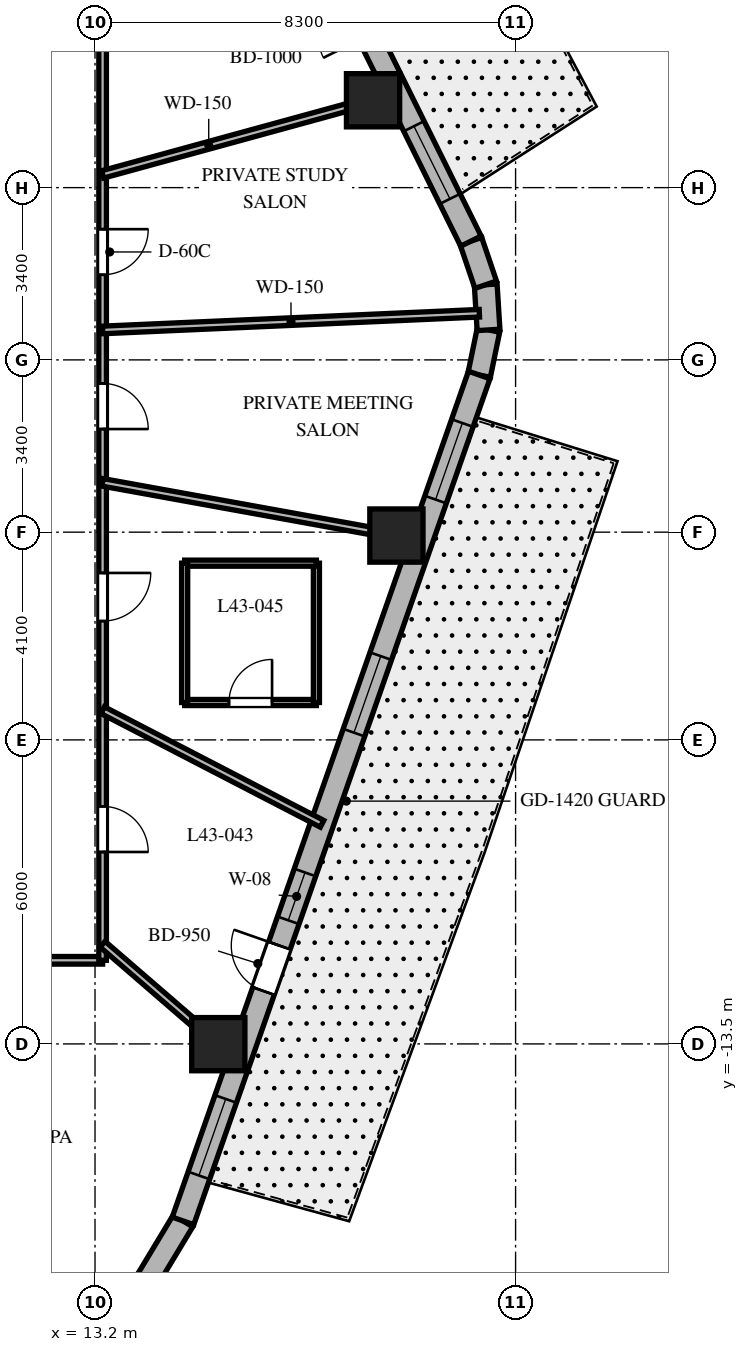
"""IFC4 building model, lengths in metres.
Left out: names, types, materials, properties, quantities, classifications, styles, units other than length and angle.
Written with IfcOpenShell. Run it as: python <this file> out.ifc"""

import sys

from ifc_helpers import new_model, si_unit, direction, frame, frame_2d, origin, origin_2d, place, context, subcontext, project, spatial, rectangle, extrude, element, fill, save


model = new_model("IFC4")
c1 = context("Model", 3, precision=1e-05, world=origin(), true_north=direction((0.0, 1.0)))
c2 = subcontext(c1, "Body", "Model", "MODEL_VIEW")
j1 = project(units=[si_unit("LENGTHUNIT", "METRE"), si_unit("PLANEANGLEUNIT", "RADIAN")], contexts=[c1])
p1 = place(None, origin())
s1 = spatial("IfcSite", under=j1, at=p1, CompositionType="ELEMENT")
p2 = place(p1, origin())
s2 = spatial("IfcBuilding", under=s1, at=p2, CompositionType="ELEMENT")
p3 = place(p2, frame((0.0, 0.0, 175.6)))
s3 = spatial("IfcBuildingStorey", under=s2, at=p3, CompositionType="ELEMENT", Elevation=175.6)
for number, where, z_axis, x_axis in (
    (1, (15.633, -13.505, 0.0), (0.0, 0.0, 1.0), (1.0, 0.0, 0.0)),
    (2, (19.148, -3.467, 0.0), (0.0, 0.0, 1.0), (1.0, 0.0, 0.0)),
    (3, (18.687, 5.124, 0.0), (0.0, 0.0, 1.0), (1.0, 0.0, 0.0)),
):
    element("IfcColumn", number, at=place(p3, frame(where, z_axis=z_axis, x_axis=x_axis)), inside=s3, PredefinedType="COLUMN", context=c2, shape_type="SweptSolid", body=[
        extrude(rectangle(XDim=1.05, YDim=1.05, at=origin_2d()), origin(), (0.0, 0.0, 1.0), 3.7),
    ])
p4 = place(p3, frame((14.214, -18.192, 0.0), z_axis=(0.0, 0.0, 1.0), x_axis=(0.516340945502, 0.856383108193, 0.0)))
e4 = element("IfcWall", 4, at=p4, inside=s3, PredefinedType="SOLIDWALL", context=c2, shape_type="SweptSolid", body=[
    extrude(rectangle(XDim=1.4, YDim=0.45, at=frame_2d((0.7, 0.0))), origin(), (0.0, 0.0, 1.0), 3.4),
])
p5 = place(p3, frame((20.782, -0.298, 0.0), z_axis=(0.0, 0.0, 1.0), x_axis=(0.202570068411, 0.979267771033, 0.0)))
e5 = element("IfcWall", 5, at=p5, inside=s3, PredefinedType="SOLIDWALL", context=c2, shape_type="SweptSolid", body=[
    extrude(rectangle(XDim=0.909, YDim=0.45, at=frame_2d((0.454, 0.0))), origin(), (0.0, 0.0, 1.0), 3.4),
])
p6 = place(p3, frame((20.966, 0.592, 0.0), z_axis=(0.0, 0.0, 1.0), x_axis=(-0.061748898935, 0.998091715966, 0.0)))
e6 = element("IfcWall", 6, at=p6, inside=s3, PredefinedType="SOLIDWALL", context=c2, shape_type="SweptSolid", body=[
    extrude(rectangle(XDim=0.894, YDim=0.45, at=frame_2d((0.447, 0.0))), origin(), (0.0, 0.0, 1.0), 3.4),
])
p7 = place(p3, frame((20.911, 1.484, 0.0), z_axis=(0.0, 0.0, 1.0), x_axis=(-0.321623334353, 0.946867694453, 0.0)))
e7 = element("IfcWall", 7, at=p7, inside=s3, PredefinedType="SOLIDWALL", context=c2, shape_type="SweptSolid", body=[
    extrude(rectangle(XDim=0.909, YDim=0.45, at=frame_2d((0.454, 0.0))), origin(), (0.0, 0.0, 1.0), 3.4),
])
p8 = place(p3, frame((14.937, -16.993, 0.0), z_axis=(0.0, 0.0, 1.0), x_axis=(0.330431575061, 0.943829949834, 0.0)))
e8 = element("IfcWall", 8, at=p8, inside=s3, PredefinedType="SOLIDWALL", context=c2, shape_type="SweptSolid", body=[
    extrude(rectangle(XDim=17.689, YDim=0.45, at=frame_2d((8.844, 0.0))), origin(), (0.0, 0.0, 1.0), 3.4),
])
p9 = place(p8, frame((4.807, 0.0, 0.0)))
e9 = element("IfcOpeningElement", 9, at=p9, cuts=e8, PredefinedType="OPENING", context=c2, shape_type="SweptSolid", body=[
    extrude(rectangle(XDim=0.95, YDim=2.15, at=frame_2d((0.475, 1.075))), frame((0.0, 0.235, 0.0), z_axis=(0.0, -1.0, 0.0), x_axis=(1.0, 0.0, 0.0)), (0.0, 0.0, 1.0), 0.47),
])
p10 = place(p8, frame((0.95, 0.0, 0.8)))
e10 = element("IfcOpeningElement", 10, at=p10, cuts=e8, PredefinedType="OPENING", context=c2, shape_type="SweptSolid", body=[
    extrude(rectangle(XDim=1.6, YDim=1.75, at=frame_2d((0.8, 0.875))), frame((0.0, 0.235, 0.0), z_axis=(0.0, -1.0, 0.0), x_axis=(1.0, 0.0, 0.0)), (0.0, 0.0, 1.0), 0.47),
])
p11 = place(p8, frame((6.286, 0.0, 0.8)))
e11 = element("IfcOpeningElement", 11, at=p11, cuts=e8, PredefinedType="OPENING", context=c2, shape_type="SweptSolid", body=[
    extrude(rectangle(XDim=1.0, YDim=1.65, at=frame_2d((0.5, 0.825))), frame((0.0, 0.235, 0.0), z_axis=(0.0, -1.0, 0.0), x_axis=(1.0, 0.0, 0.0)), (0.0, 0.0, 1.0), 0.47),
])
p12 = place(p8, frame((10.21, 0.0, 0.8)))
e12 = element("IfcOpeningElement", 12, at=p12, cuts=e8, PredefinedType="OPENING", context=c2, shape_type="SweptSolid", body=[
    extrude(rectangle(XDim=1.6, YDim=1.75, at=frame_2d((0.8, 0.875))), frame((0.0, 0.235, 0.0), z_axis=(0.0, -1.0, 0.0), x_axis=(1.0, 0.0, 0.0)), (0.0, 0.0, 1.0), 0.47),
])
p13 = place(p8, frame((15.084, 0.0, 0.8)))
e13 = element("IfcOpeningElement", 13, at=p13, cuts=e8, PredefinedType="OPENING", context=c2, shape_type="SweptSolid", body=[
    extrude(rectangle(XDim=1.6, YDim=1.75, at=frame_2d((0.8, 0.875))), frame((0.0, 0.235, 0.0), z_axis=(0.0, -1.0, 0.0), x_axis=(1.0, 0.0, 0.0)), (0.0, 0.0, 1.0), 0.47),
])
p14 = place(p3, frame((20.618, 2.344, 0.0), z_axis=(0.0, 0.0, 1.0), x_axis=(-0.444243691097, 0.895905990002, 0.0)))
e14 = element("IfcWall", 14, at=p14, inside=s3, PredefinedType="SOLIDWALL", context=c2, shape_type="SweptSolid", body=[
    extrude(rectangle(XDim=16.784, YDim=0.45, at=frame_2d((8.392, 0.0))), origin(), (0.0, 0.0, 1.0), 3.4),
])
p15 = place(p14, frame((4.535, 0.0, 0.0)))
e15 = element("IfcOpeningElement", 15, at=p15, cuts=e14, PredefinedType="OPENING", context=c2, shape_type="SweptSolid", body=[
    extrude(rectangle(XDim=1.0, YDim=2.15, at=frame_2d((0.5, 1.075))), frame((0.0, 0.235, 0.0), z_axis=(0.0, -1.0, 0.0), x_axis=(1.0, 0.0, 0.0)), (0.0, 0.0, 1.0), 0.47),
])
p16 = place(p14, frame((0.931, 0.0, 0.8)))
e16 = element("IfcOpeningElement", 16, at=p16, cuts=e14, PredefinedType="OPENING", context=c2, shape_type="SweptSolid", body=[
    extrude(rectangle(XDim=1.6, YDim=1.75, at=frame_2d((0.8, 0.875))), frame((0.0, 0.235, 0.0), z_axis=(0.0, -1.0, 0.0), x_axis=(1.0, 0.0, 0.0)), (0.0, 0.0, 1.0), 0.47),
])
p17 = place(p14, frame((7.642, 0.0, 0.8)))
e17 = element("IfcOpeningElement", 17, at=p17, cuts=e14, PredefinedType="OPENING", context=c2, shape_type="SweptSolid", body=[
    extrude(rectangle(XDim=1.6, YDim=1.75, at=frame_2d((0.8, 0.875))), frame((0.0, 0.235, 0.0), z_axis=(0.0, -1.0, 0.0), x_axis=(1.0, 0.0, 0.0)), (0.0, 0.0, 1.0), 0.47),
])
p18 = place(p14, frame((14.303, 0.0, 0.8)))
e18 = element("IfcOpeningElement", 18, at=p18, cuts=e14, PredefinedType="OPENING", context=c2, shape_type="SweptSolid", body=[
    extrude(rectangle(XDim=1.6, YDim=1.75, at=frame_2d((0.8, 0.875))), frame((0.0, 0.235, 0.0), z_axis=(0.0, -1.0, 0.0), x_axis=(1.0, 0.0, 0.0)), (0.0, 0.0, 1.0), 0.47),
])
p19 = place(p3, frame((13.35, -11.85, 0.0), z_axis=(0.0, 0.0, 1.0), x_axis=(-1.0, 0.0, 0.0)))
e19 = element("IfcWall", 19, at=p19, inside=s3, PredefinedType="PARTITIONING", context=c2, shape_type="SweptSolid", body=[
    extrude(rectangle(XDim=26.7, YDim=0.15, at=frame_2d((13.35, 0.0))), origin(), (0.0, 0.0, 1.0), 2.84),
])
p20 = place(p19, frame((22.7, 0.0, 0.0)))
e20 = element("IfcOpeningElement", 20, at=p20, cuts=e19, PredefinedType="OPENING", context=c2, shape_type="SweptSolid", body=[
    extrude(rectangle(XDim=0.9, YDim=2.03, at=frame_2d((0.45, 1.015))), frame((0.0, 0.085, 0.0), z_axis=(0.0, -1.0, 0.0), x_axis=(1.0, 0.0, 0.0)), (0.0, 0.0, 1.0), 0.17),
])
p21 = place(p19, frame((18.523, 0.0, 0.0)))
e21 = element("IfcOpeningElement", 21, at=p21, cuts=e19, PredefinedType="OPENING", context=c2, shape_type="SweptSolid", body=[
    extrude(rectangle(XDim=0.95, YDim=2.03, at=frame_2d((0.475, 1.015))), frame((0.0, 0.085, 0.0), z_axis=(0.0, -1.0, 0.0), x_axis=(1.0, 0.0, 0.0)), (0.0, 0.0, 1.0), 0.17),
])
p22 = place(p19, frame((14.469, 0.0, 0.0)))
e22 = element("IfcOpeningElement", 22, at=p22, cuts=e19, PredefinedType="OPENING", context=c2, shape_type="SweptSolid", body=[
    extrude(rectangle(XDim=0.95, YDim=2.03, at=frame_2d((0.475, 1.015))), frame((0.0, 0.085, 0.0), z_axis=(0.0, -1.0, 0.0), x_axis=(1.0, 0.0, 0.0)), (0.0, 0.0, 1.0), 0.17),
])
p23 = place(p19, frame((10.314, 0.0, 0.0)))
e23 = element("IfcOpeningElement", 23, at=p23, cuts=e19, PredefinedType="OPENING", context=c2, shape_type="SweptSolid", body=[
    extrude(rectangle(XDim=0.95, YDim=2.03, at=frame_2d((0.475, 1.015))), frame((0.0, 0.085, 0.0), z_axis=(0.0, -1.0, 0.0), x_axis=(1.0, 0.0, 0.0)), (0.0, 0.0, 1.0), 0.17),
])
p24 = place(p19, frame((3.995, 0.0, 0.0)))
e24 = element("IfcOpeningElement", 24, at=p24, cuts=e19, PredefinedType="OPENING", context=c2, shape_type="SweptSolid", body=[
    extrude(rectangle(XDim=0.95, YDim=2.03, at=frame_2d((0.475, 1.015))), frame((0.0, 0.085, 0.0), z_axis=(0.0, -1.0, 0.0), x_axis=(1.0, 0.0, 0.0)), (0.0, 0.0, 1.0), 0.17),
])
p25 = place(p3, frame((13.35, 11.85, 0.0), z_axis=(0.0, 0.0, 1.0), x_axis=(0.0, -1.0, 0.0)))
e25 = element("IfcWall", 25, at=p25, inside=s3, PredefinedType="PARTITIONING", context=c2, shape_type="SweptSolid", body=[
    extrude(rectangle(XDim=23.7, YDim=0.15, at=frame_2d((11.85, 0.0))), origin(), (0.0, 0.0, 1.0), 2.84),
])
p26 = place(p25, frame((9.27, 0.0, 0.0)))
e26 = element("IfcOpeningElement", 26, at=p26, cuts=e25, PredefinedType="OPENING", context=c2, shape_type="SweptSolid", body=[
    extrude(rectangle(XDim=0.9, YDim=2.03, at=frame_2d((0.45, 1.015))), frame((0.0, 0.085, 0.0), z_axis=(0.0, -1.0, 0.0), x_axis=(1.0, 0.0, 0.0)), (0.0, 0.0, 1.0), 0.17),
])
p27 = place(p25, frame((3.765, 0.0, 0.0)))
e27 = element("IfcOpeningElement", 27, at=p27, cuts=e25, PredefinedType="OPENING", context=c2, shape_type="SweptSolid", body=[
    extrude(rectangle(XDim=0.9, YDim=2.03, at=frame_2d((0.45, 1.015))), frame((0.0, 0.085, 0.0), z_axis=(0.0, -1.0, 0.0), x_axis=(1.0, 0.0, 0.0)), (0.0, 0.0, 1.0), 0.17),
])
p28 = place(p25, frame((20.662, 0.0, 0.0)))
e28 = element("IfcOpeningElement", 28, at=p28, cuts=e25, PredefinedType="OPENING", context=c2, shape_type="SweptSolid", body=[
    extrude(rectangle(XDim=0.9, YDim=2.03, at=frame_2d((0.45, 1.015))), frame((0.0, 0.085, 0.0), z_axis=(0.0, -1.0, 0.0), x_axis=(1.0, 0.0, 0.0)), (0.0, 0.0, 1.0), 0.17),
])
p29 = place(p25, frame((16.055, 0.0, 0.0)))
e29 = element("IfcOpeningElement", 29, at=p29, cuts=e25, PredefinedType="OPENING", context=c2, shape_type="SweptSolid", body=[
    extrude(rectangle(XDim=0.95, YDim=2.03, at=frame_2d((0.475, 1.015))), frame((0.0, 0.085, 0.0), z_axis=(0.0, -1.0, 0.0), x_axis=(1.0, 0.0, 0.0)), (0.0, 0.0, 1.0), 0.17),
])
p30 = place(p25, frame((12.315, 0.0, 0.0)))
e30 = element("IfcOpeningElement", 30, at=p30, cuts=e25, PredefinedType="OPENING", context=c2, shape_type="SweptSolid", body=[
    extrude(rectangle(XDim=0.9, YDim=2.03, at=frame_2d((0.45, 1.015))), frame((0.0, 0.085, 0.0), z_axis=(0.0, -1.0, 0.0), x_axis=(1.0, 0.0, 0.0)), (0.0, 0.0, 1.0), 0.17),
])
p31 = place(p3, frame((13.35, 0.591, 0.0), z_axis=(0.0, 0.0, 1.0), x_axis=(0.999020359631, 0.044252921296, 0.0)))
e31 = element("IfcWall", 31, at=p31, inside=s3, PredefinedType="PARTITIONING", context=c2, shape_type="SweptSolid", body=[
    extrude(rectangle(XDim=7.442, YDim=0.15, at=frame_2d((3.721, 0.0))), origin(), (0.0, 0.0, 1.0), 2.64),
])
p32 = place(p3, frame((13.35, 3.661, 0.0), z_axis=(0.0, 0.0, 1.0), x_axis=(0.964397145454, 0.264458211898, 0.0)))
e32 = element("IfcWall", 32, at=p32, inside=s3, PredefinedType="PARTITIONING", context=c2, shape_type="SweptSolid", body=[
    extrude(rectangle(XDim=6.039, YDim=0.15, at=frame_2d((3.019, 0.0))), origin(), (0.0, 0.0, 1.0), 2.64),
])
p33 = place(p3, frame((13.35, -11.533, 0.0), z_axis=(0.0, 0.0, 1.0), x_axis=(0.756711647314, -0.65374879183, 0.0)))
e33 = element("IfcWall", 33, at=p33, inside=s3, PredefinedType="PARTITIONING", context=c2, shape_type="SweptSolid", body=[
    extrude(rectangle(XDim=3.55, YDim=0.15, at=frame_2d((1.775, 0.0))), origin(), (0.0, 0.0, 1.0), 2.64),
])
p34 = place(p3, frame((13.35, -6.913, 0.0), z_axis=(0.0, 0.0, 1.0), x_axis=(0.887989298603, -0.459864116415, 0.0)))
e34 = element("IfcWall", 34, at=p34, inside=s3, PredefinedType="PARTITIONING", context=c2, shape_type="SweptSolid", body=[
    extrude(rectangle(XDim=4.877, YDim=0.15, at=frame_2d((2.438, 0.0))), origin(), (0.0, 0.0, 1.0), 2.64),
])
p35 = place(p3, frame((13.35, -2.417, 0.0), z_axis=(0.0, 0.0, 1.0), x_axis=(0.98399796473, -0.178179699761, 0.0)))
e35 = element("IfcWall", 35, at=p35, inside=s3, PredefinedType="PARTITIONING", context=c2, shape_type="SweptSolid", body=[
    extrude(rectangle(XDim=6.393, YDim=0.15, at=frame_2d((3.197, 0.0))), origin(), (0.0, 0.0, 1.0), 2.64),
])
p36 = place(p3, frame((14.969, -6.762, 0.0), z_axis=(0.0, 0.0, 1.0), x_axis=(1.0, 0.0, 0.0)))
e36 = element("IfcWall", 36, at=p36, inside=s3, PredefinedType="PARTITIONING", context=c2, shape_type="SweptSolid", body=[
    extrude(rectangle(XDim=2.6, YDim=0.12, at=frame_2d((1.3, 0.0))), origin(), (0.0, 0.0, 1.0), 2.972),
])
p37 = place(p36, frame((0.875, 0.0, 0.0)))
e37 = element("IfcOpeningElement", 37, at=p37, cuts=e36, PredefinedType="OPENING", context=c2, shape_type="SweptSolid", body=[
    extrude(rectangle(XDim=0.85, YDim=2.03, at=frame_2d((0.425, 1.015))), frame((0.0, 0.07, 0.0), z_axis=(0.0, -1.0, 0.0), x_axis=(1.0, 0.0, 0.0)), (0.0, 0.0, 1.0), 0.14),
])
p38 = place(p3, frame((17.569, -6.762, 0.0), z_axis=(0.0, 0.0, 1.0), x_axis=(0.0, 1.0, 0.0)))
e38 = element("IfcWall", 38, at=p38, inside=s3, PredefinedType="PARTITIONING", context=c2, shape_type="SweptSolid", body=[
    extrude(rectangle(XDim=2.75, YDim=0.12, at=frame_2d((1.375, 0.0))), origin(), (0.0, 0.0, 1.0), 2.84),
])
p39 = place(p3, frame((17.569, -4.012, 0.0), z_axis=(0.0, 0.0, 1.0), x_axis=(-1.0, 0.0, 0.0)))
e39 = element("IfcWall", 39, at=p39, inside=s3, PredefinedType="PARTITIONING", context=c2, shape_type="SweptSolid", body=[
    extrude(rectangle(XDim=2.6, YDim=0.12, at=frame_2d((1.3, 0.0))), origin(), (0.0, 0.0, 1.0), 2.84),
])
p40 = place(p3, frame((14.969, -4.012, 0.0), z_axis=(0.0, 0.0, 1.0), x_axis=(0.0, -1.0, 0.0)))
e40 = element("IfcWall", 40, at=p40, inside=s3, PredefinedType="PARTITIONING", context=c2, shape_type="SweptSolid", body=[
    extrude(rectangle(XDim=2.75, YDim=0.12, at=frame_2d((1.375, 0.0))), origin(), (0.0, 0.0, 1.0), 2.84),
])
p41 = place(p9, origin())
e41 = element("IfcDoor", 41, at=p41, inside=s3, OperationType="SINGLE_SWING_RIGHT", PredefinedType="DOOR", context=c2, shape_type="SweptSolid", body=[
    extrude(rectangle(XDim=0.95, YDim=2.15, at=frame_2d((0.475, 1.075))), frame((0.0, 0.025, 0.0), z_axis=(0.0, -1.0, 0.0), x_axis=(1.0, 0.0, 0.0)), (0.0, 0.0, 1.0), 0.05),
])
fill(e9, e41)
p42 = place(p10, origin())
e42 = element("IfcWindow", 42, at=p42, inside=s3, PartitioningType="SINGLE_PANEL", PredefinedType="WINDOW", context=c2, shape_type="SweptSolid", body=[
    extrude(rectangle(XDim=1.6, YDim=1.75, at=frame_2d((0.8, 0.875))), frame((0.0, 0.03, 0.0), z_axis=(0.0, -1.0, 0.0), x_axis=(1.0, 0.0, 0.0)), (0.0, 0.0, 1.0), 0.06),
])
fill(e10, e42)
p43 = place(p11, origin())
e43 = element("IfcWindow", 43, at=p43, inside=s3, PartitioningType="SINGLE_PANEL", PredefinedType="WINDOW", context=c2, shape_type="SweptSolid", body=[
    extrude(rectangle(XDim=1.0, YDim=1.65, at=frame_2d((0.5, 0.825))), frame((0.0, 0.03, 0.0), z_axis=(0.0, -1.0, 0.0), x_axis=(1.0, 0.0, 0.0)), (0.0, 0.0, 1.0), 0.06),
])
fill(e11, e43)
p44 = place(p12, origin())
e44 = element("IfcWindow", 44, at=p44, inside=s3, PartitioningType="SINGLE_PANEL", PredefinedType="WINDOW", context=c2, shape_type="SweptSolid", body=[
    extrude(rectangle(XDim=1.6, YDim=1.75, at=frame_2d((0.8, 0.875))), frame((0.0, 0.03, 0.0), z_axis=(0.0, -1.0, 0.0), x_axis=(1.0, 0.0, 0.0)), (0.0, 0.0, 1.0), 0.06),
])
fill(e12, e44)
p45 = place(p13, origin())
e45 = element("IfcWindow", 45, at=p45, inside=s3, PartitioningType="SINGLE_PANEL", PredefinedType="WINDOW", context=c2, shape_type="SweptSolid", body=[
    extrude(rectangle(XDim=1.6, YDim=1.75, at=frame_2d((0.8, 0.875))), frame((0.0, 0.03, 0.0), z_axis=(0.0, -1.0, 0.0), x_axis=(1.0, 0.0, 0.0)), (0.0, 0.0, 1.0), 0.06),
])
fill(e13, e45)
p46 = place(p16, origin())
e46 = element("IfcWindow", 46, at=p46, inside=s3, PartitioningType="SINGLE_PANEL", PredefinedType="WINDOW", context=c2, shape_type="SweptSolid", body=[
    extrude(rectangle(XDim=1.6, YDim=1.75, at=frame_2d((0.8, 0.875))), frame((0.0, 0.03, 0.0), z_axis=(0.0, -1.0, 0.0), x_axis=(1.0, 0.0, 0.0)), (0.0, 0.0, 1.0), 0.06),
])
fill(e16, e46)
p47 = place(p26, origin())
e47 = element("IfcDoor", 47, at=p47, inside=s3, OperationType="SINGLE_SWING_LEFT", PredefinedType="DOOR", context=c2, shape_type="SweptSolid", body=[
    extrude(rectangle(XDim=0.9, YDim=2.03, at=frame_2d((0.45, 1.015))), frame((0.0, 0.025, 0.0), z_axis=(0.0, -1.0, 0.0), x_axis=(1.0, 0.0, 0.0)), (0.0, 0.0, 1.0), 0.05),
])
fill(e26, e47)
p48 = place(p28, origin())
e48 = element("IfcDoor", 48, at=p48, inside=s3, OperationType="SINGLE_SWING_RIGHT", PredefinedType="DOOR", context=c2, shape_type="SweptSolid", body=[
    extrude(rectangle(XDim=0.9, YDim=2.03, at=frame_2d((0.45, 1.015))), frame((0.0, 0.025, 0.0), z_axis=(0.0, -1.0, 0.0), x_axis=(1.0, 0.0, 0.0)), (0.0, 0.0, 1.0), 0.05),
])
fill(e28, e48)
p49 = place(p29, origin())
e49 = element("IfcDoor", 49, at=p49, inside=s3, OperationType="SINGLE_SWING_LEFT", PredefinedType="DOOR", context=c2, shape_type="SweptSolid", body=[
    extrude(rectangle(XDim=0.95, YDim=2.03, at=frame_2d((0.475, 1.015))), frame((0.0, 0.025, 0.0), z_axis=(0.0, -1.0, 0.0), x_axis=(1.0, 0.0, 0.0)), (0.0, 0.0, 1.0), 0.05),
])
fill(e29, e49)
p50 = place(p37, origin())
e50 = element("IfcDoor", 50, at=p50, inside=s3, OperationType="SINGLE_SWING_RIGHT", PredefinedType="DOOR", context=c2, shape_type="SweptSolid", body=[
    extrude(rectangle(XDim=0.85, YDim=2.03, at=frame_2d((0.425, 1.015))), frame((0.0, 0.025, 0.0), z_axis=(0.0, -1.0, 0.0), x_axis=(1.0, 0.0, 0.0)), (0.0, 0.0, 1.0), 0.05),
])
fill(e37, e50)
p51 = place(p30, origin())
e51 = element("IfcDoor", 51, at=p51, inside=s3, OperationType="SINGLE_SWING_RIGHT", PredefinedType="DOOR", context=c2, shape_type="SweptSolid", body=[
    extrude(rectangle(XDim=0.9, YDim=2.03, at=frame_2d((0.45, 1.015))), frame((0.0, 0.025, 0.0), z_axis=(0.0, -1.0, 0.0), x_axis=(1.0, 0.0, 0.0)), (0.0, 0.0, 1.0), 0.05),
])
fill(e30, e51)
save(model, sys.argv[1])
